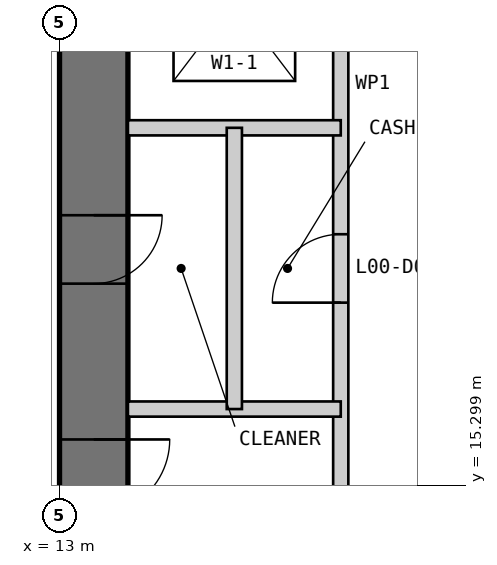
"""IFC4 building model, lengths in metres.
Left out: names, types, materials, properties, quantities, classifications, styles, units other than length and angle.
Written with IfcOpenShell. Run it as: python <this file> out.ifc"""

import sys

from ifc_helpers import new_model, si_unit, direction, frame, frame_2d, origin, place, context, subcontext, project, spatial, polyline, rectangle, outline, extrude, element, fill, save


model = new_model("IFC4")
c1 = context("Model", 3, precision=1e-05, world=origin(), true_north=direction((0.0, 1.0)))
c2 = subcontext(c1, "Body", "Model", "MODEL_VIEW")
j1 = project(units=[si_unit("LENGTHUNIT", "METRE"), si_unit("PLANEANGLEUNIT", "RADIAN")], contexts=[c1])
p1 = place(None, origin())
s1 = spatial("IfcSite", under=j1, at=p1, CompositionType="ELEMENT")
p2 = place(p1, origin())
s2 = spatial("IfcBuilding", under=s1, at=p2, CompositionType="ELEMENT")
p3 = place(p2, origin())
s3 = spatial("IfcBuildingStorey", under=s2, at=p3, CompositionType="ELEMENT", Elevation=0.0)
p4 = place(p3, frame((13.45, 36.1, 0.0), z_axis=(0.0, 0.0, 1.0), x_axis=(0.0, -1.0, 0.0)))
e1 = element("IfcWall", 1, at=p4, inside=s3, PredefinedType="SHEAR", context=c2, shape_type="SweptSolid", body=[
    extrude(outline(polyline([(-0.9, -0.45), (23.1, -0.45), (22.2, 0.45), (0.0, 0.45), (-0.9, -0.45)])), origin(), (0.0, 0.0, 1.0), 7.0),
])
p5 = place(p4, frame((20.2, 0.0, 0.0)))
e2 = element("IfcOpeningElement", 2, at=p5, cuts=e1, PredefinedType="OPENING", context=c2, shape_type="SweptSolid", body=[
    extrude(rectangle(XDim=1.0, YDim=2.2, at=frame_2d((0.5, 1.1))), frame((0.0, 0.46, 0.0), z_axis=(0.0, -1.0, 0.0), x_axis=(1.0, 0.0, 0.0)), (0.0, 0.0, 1.0), 0.92),
])
p6 = place(p4, frame((17.25, 0.0, 0.0)))
e3 = element("IfcOpeningElement", 3, at=p6, cuts=e1, PredefinedType="OPENING", context=c2, shape_type="SweptSolid", body=[
    extrude(rectangle(XDim=0.9, YDim=2.2, at=frame_2d((0.45, 1.1))), frame((0.0, 0.46, 0.0), z_axis=(0.0, -1.0, 0.0), x_axis=(1.0, 0.0, 0.0)), (0.0, 0.0, 1.0), 0.92),
])
p7 = place(p3, frame((16.7, 13.9, 0.0), z_axis=(0.0, 0.0, 1.0), x_axis=(0.0, 1.0, 0.0)))
e4 = element("IfcWall", 4, at=p7, inside=s3, PredefinedType="PARTITIONING", context=c2, shape_type="SweptSolid", body=[
    extrude(rectangle(XDim=16.1, YDim=0.2, at=frame_2d((8.05, 0.0))), origin(), (0.0, 0.0, 1.0), 6.8),
])
p8 = place(p7, frame((3.8, 0.0, 0.0)))
e5 = element("IfcOpeningElement", 5, at=p8, cuts=e4, PredefinedType="OPENING", context=c2, shape_type="SweptSolid", body=[
    extrude(rectangle(XDim=0.9, YDim=2.2, at=frame_2d((0.45, 1.1))), frame((0.0, 0.11, 0.0), z_axis=(0.0, -1.0, 0.0), x_axis=(1.0, 0.0, 0.0)), (0.0, 0.0, 1.0), 0.22),
])
p9 = place(p7, frame((7.217, 0.0, 0.0)))
e6 = element("IfcOpeningElement", 6, at=p9, cuts=e4, PredefinedType="OPENING", context=c2, shape_type="SweptSolid", body=[
    extrude(rectangle(XDim=1.1, YDim=2.2, at=frame_2d((0.55, 1.1))), frame((0.0, 0.11, 0.0), z_axis=(0.0, -1.0, 0.0), x_axis=(1.0, 0.0, 0.0)), (0.0, 0.0, 1.0), 0.22),
])
p10 = place(p7, frame((10.55, 0.0, 0.0)))
e7 = element("IfcOpeningElement", 7, at=p10, cuts=e4, PredefinedType="OPENING", context=c2, shape_type="SweptSolid", body=[
    extrude(rectangle(XDim=1.1, YDim=2.2, at=frame_2d((0.55, 1.1))), frame((0.0, 0.11, 0.0), z_axis=(0.0, -1.0, 0.0), x_axis=(1.0, 0.0, 0.0)), (0.0, 0.0, 1.0), 0.22),
])
p11 = place(p7, frame((13.883, 0.0, 0.0)))
e8 = element("IfcOpeningElement", 8, at=p11, cuts=e4, PredefinedType="OPENING", context=c2, shape_type="SweptSolid", body=[
    extrude(rectangle(XDim=1.1, YDim=2.2, at=frame_2d((0.55, 1.1))), frame((0.0, 0.11, 0.0), z_axis=(0.0, -1.0, 0.0), x_axis=(1.0, 0.0, 0.0)), (0.0, 0.0, 1.0), 0.22),
])
for number, where, z_axis, x_axis in (
    (9, (13.9, 20.0, 0.0), (0.0, 0.0, 1.0), (1.0, 0.0, 0.0)),
    (10, (13.9, 16.3, 0.0), (0.0, 0.0, 1.0), (1.0, 0.0, 0.0)),
):
    element("IfcWall", number, at=place(p3, frame(where, z_axis=z_axis, x_axis=x_axis)), inside=s3, PredefinedType="PARTITIONING", context=c2, shape_type="SweptSolid", body=[
        extrude(rectangle(XDim=2.8, YDim=0.2, at=frame_2d((1.4, 0.0))), origin(), (0.0, 0.0, 1.0), 6.8),
    ])
p12 = place(p3, frame((15.3, 16.3, 0.0), z_axis=(0.0, 0.0, 1.0), x_axis=(0.0, 1.0, 0.0)))
e11 = element("IfcWall", 11, at=p12, inside=s3, PredefinedType="PARTITIONING", context=c2, shape_type="SweptSolid", body=[
    extrude(rectangle(XDim=3.7, YDim=0.2, at=frame_2d((1.85, 0.0))), origin(), (0.0, 0.0, 1.0), 6.8),
])
p13 = place(p5, origin())
e12 = element("IfcDoor", 12, at=p13, inside=s3, OperationType="SINGLE_SWING_LEFT", PredefinedType="DOOR", context=c2, shape_type="SweptSolid", body=[
    extrude(rectangle(XDim=1.0, YDim=2.2, at=frame_2d((0.5, 1.1))), frame((0.0, 0.025, 0.0), z_axis=(0.0, -1.0, 0.0), x_axis=(1.0, 0.0, 0.0)), (0.0, 0.0, 1.0), 0.05),
    extrude(outline(polyline([(0.0, 0.0), (0.04, 0.0), (0.04, 2.16), (0.96, 2.16), (0.96, 0.0), (1.0, 0.0), (1.0, 2.2), (0.0, 2.2), (0.0, 0.0)])), frame((0.0, 0.3, 0.0), z_axis=(0.0, -1.0, 0.0), x_axis=(1.0, 0.0, 0.0)), (0.0, 0.0, 1.0), 0.6),
])
fill(e2, e12)
p14 = place(p8, origin())
e13 = element("IfcDoor", 13, at=p14, inside=s3, OperationType="SINGLE_SWING_LEFT", PredefinedType="DOOR", context=c2, shape_type="SweptSolid", body=[
    extrude(rectangle(XDim=0.9, YDim=2.2, at=frame_2d((0.45, 1.1))), frame((0.0, 0.025, 0.0), z_axis=(0.0, -1.0, 0.0), x_axis=(1.0, 0.0, 0.0)), (0.0, 0.0, 1.0), 0.05),
])
fill(e5, e13)
p15 = place(p6, origin())
e14 = element("IfcDoor", 14, at=p15, inside=s3, OperationType="SINGLE_SWING_LEFT", PredefinedType="DOOR", context=c2, shape_type="SweptSolid", body=[
    extrude(rectangle(XDim=0.9, YDim=2.2, at=frame_2d((0.45, 1.1))), frame((0.0, 0.025, 0.0), z_axis=(0.0, -1.0, 0.0), x_axis=(1.0, 0.0, 0.0)), (0.0, 0.0, 1.0), 0.05),
    extrude(outline(polyline([(0.0, 0.0), (0.04, 0.0), (0.04, 2.16), (0.86, 2.16), (0.86, 0.0), (0.9, 0.0), (0.9, 2.2), (0.0, 2.2), (0.0, 0.0)])), frame((0.0, 0.3, 0.0), z_axis=(0.0, -1.0, 0.0), x_axis=(1.0, 0.0, 0.0)), (0.0, 0.0, 1.0), 0.6),
])
fill(e3, e14)
save(model, sys.argv[1])
